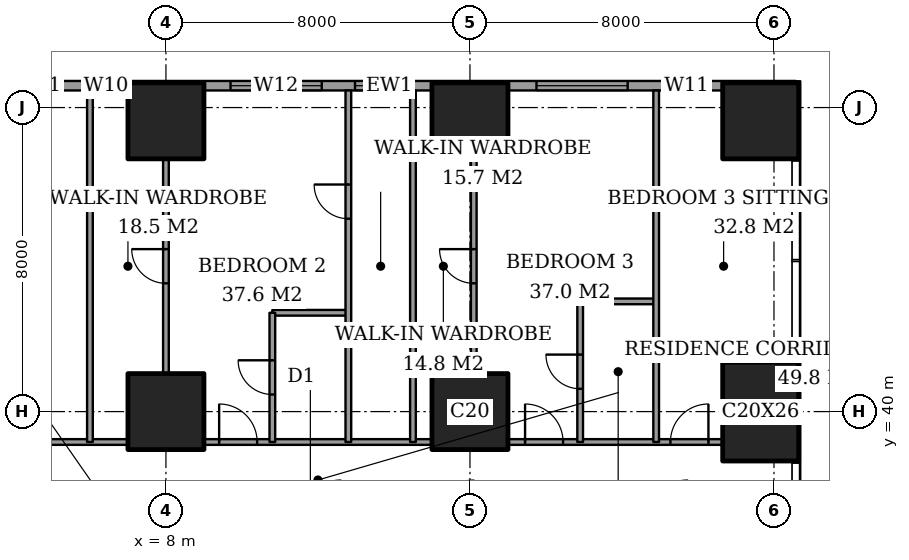
"""IFC4 building model, lengths in metres.
Left out: names, types, materials, properties, quantities, classifications, styles, units other than length and angle.
Written with IfcOpenShell. Run it as: python <this file> out.ifc"""

import sys

from ifc_helpers import new_model, si_unit, direction, frame, frame_2d, origin, origin_2d, place, context, subcontext, project, spatial, rectangle, extrude, element, fill, save


model = new_model("IFC4")
c1 = context("Model", 3, precision=1e-05, world=origin(), true_north=direction((0.0, 1.0)))
c2 = subcontext(c1, "Body", "Model", "MODEL_VIEW")
j1 = project(units=[si_unit("LENGTHUNIT", "METRE"), si_unit("PLANEANGLEUNIT", "RADIAN")], contexts=[c1])
p1 = place(None, origin())
s1 = spatial("IfcSite", under=j1, at=p1, CompositionType="ELEMENT")
p2 = place(p1, origin())
s2 = spatial("IfcBuilding", under=s1, at=p2, CompositionType="ELEMENT")
p3 = place(p2, frame((0.0, 0.0, 114.2)))
s3 = spatial("IfcBuildingStorey", under=s2, at=p3, CompositionType="ELEMENT", Elevation=114.2)
for number, where, z_axis, x_axis in (
    (1, (8.0, 40.0, 0.0), (0.0, 0.0, 1.0), (1.0, 0.0, 0.0)),
    (2, (8.0, 47.65, 0.0), (0.0, 0.0, 1.0), (1.0, 0.0, 0.0)),
    (3, (16.0, 40.0, 0.0), (0.0, 0.0, 1.0), (1.0, 0.0, 0.0)),
    (4, (16.0, 47.65, 0.0), (0.0, 0.0, 1.0), (1.0, 0.0, 0.0)),
):
    element("IfcColumn", number, at=place(p3, frame(where, z_axis=z_axis, x_axis=x_axis)), inside=s3, PredefinedType="COLUMN", context=c2, shape_type="SweptSolid", body=[
        extrude(rectangle(XDim=2.0, YDim=2.0, at=origin_2d()), origin(), (0.0, 0.0, 1.0), 3.6),
    ])
p4 = place(p3, frame((23.65, 40.0, 0.0), z_axis=(0.0, 0.0, 1.0), x_axis=(1.0, 0.0, 0.0)))
e5 = element("IfcColumn", 5, at=p4, inside=s3, PredefinedType="COLUMN", context=c2, shape_type="SweptSolid", body=[
    extrude(rectangle(XDim=2.0, YDim=2.6, at=origin_2d()), origin(), (0.0, 0.0, 1.0), 3.6),
])
p5 = place(p3, frame((23.65, 47.65, 0.0), z_axis=(0.0, 0.0, 1.0), x_axis=(1.0, 0.0, 0.0)))
e6 = element("IfcColumn", 6, at=p5, inside=s3, PredefinedType="COLUMN", context=c2, shape_type="SweptSolid", body=[
    extrude(rectangle(XDim=2.0, YDim=2.0, at=origin_2d()), origin(), (0.0, 0.0, 1.0), 3.6),
])
p6 = place(p3, frame((24.575, 48.575, 0.0), z_axis=(0.0, 0.0, 1.0), x_axis=(-1.0, 0.0, 0.0)))
e7 = element("IfcWall", 7, at=p6, inside=s3, PredefinedType="SOLIDWALL", context=c2, shape_type="SweptSolid", body=[
    extrude(rectangle(XDim=21.4, YDim=0.25, at=frame_2d((10.7, 0.0))), origin(), (0.0, 0.0, 1.0), 3.6),
])
p7 = place(p6, frame((2.275, 0.0, 0.4)))
e8 = element("IfcOpeningElement", 8, at=p7, cuts=e7, PredefinedType="OPENING", context=c2, shape_type="SweptSolid", body=[
    extrude(rectangle(XDim=1.2, YDim=2.2, at=frame_2d((0.6, 1.1))), frame((0.0, 0.135, 0.0), z_axis=(0.0, -1.0, 0.0), x_axis=(1.0, 0.0, 0.0)), (0.0, 0.0, 1.0), 0.27),
])
p8 = place(p6, frame((4.425, 0.0, 0.4)))
e9 = element("IfcOpeningElement", 9, at=p8, cuts=e7, PredefinedType="OPENING", context=c2, shape_type="SweptSolid", body=[
    extrude(rectangle(XDim=2.4, YDim=2.2, at=frame_2d((1.2, 1.1))), frame((0.0, 0.135, 0.0), z_axis=(0.0, -1.0, 0.0), x_axis=(1.0, 0.0, 0.0)), (0.0, 0.0, 1.0), 0.27),
])
p9 = place(p6, frame((10.4, 0.0, 0.4)))
e10 = element("IfcOpeningElement", 10, at=p9, cuts=e7, PredefinedType="OPENING", context=c2, shape_type="SweptSolid", body=[
    extrude(rectangle(XDim=1.2, YDim=2.2, at=frame_2d((0.6, 1.1))), frame((0.0, 0.135, 0.0), z_axis=(0.0, -1.0, 0.0), x_axis=(1.0, 0.0, 0.0)), (0.0, 0.0, 1.0), 0.27),
])
p10 = place(p6, frame((12.475, 0.0, 0.4)))
e11 = element("IfcOpeningElement", 11, at=p10, cuts=e7, PredefinedType="OPENING", context=c2, shape_type="SweptSolid", body=[
    extrude(rectangle(XDim=2.4, YDim=2.2, at=frame_2d((1.2, 1.1))), frame((0.0, 0.135, 0.0), z_axis=(0.0, -1.0, 0.0), x_axis=(1.0, 0.0, 0.0)), (0.0, 0.0, 1.0), 0.27),
])
p11 = place(p6, frame((17.85, 0.0, 0.4)))
e12 = element("IfcOpeningElement", 12, at=p11, cuts=e7, PredefinedType="OPENING", context=c2, shape_type="SweptSolid", body=[
    extrude(rectangle(XDim=0.6, YDim=2.2, at=frame_2d((0.3, 1.1))), frame((0.0, 0.135, 0.0), z_axis=(0.0, -1.0, 0.0), x_axis=(1.0, 0.0, 0.0)), (0.0, 0.0, 1.0), 0.27),
])
p12 = place(p6, frame((19.325, 0.0, 0.4)))
e13 = element("IfcOpeningElement", 13, at=p12, cuts=e7, PredefinedType="OPENING", context=c2, shape_type="SweptSolid", body=[
    extrude(rectangle(XDim=1.2, YDim=2.2, at=frame_2d((0.6, 1.1))), frame((0.0, 0.135, 0.0), z_axis=(0.0, -1.0, 0.0), x_axis=(1.0, 0.0, 0.0)), (0.0, 0.0, 1.0), 0.27),
])
p13 = place(p3, frame((1.35, 39.2, 0.0), z_axis=(0.0, 0.0, 1.0), x_axis=(1.0, 0.0, 0.0)))
e14 = element("IfcWall", 14, at=p13, inside=s3, PredefinedType="PARTITIONING", context=c2, shape_type="SweptSolid", body=[
    extrude(rectangle(XDim=5.65, YDim=0.15, at=frame_2d((2.825, 0.0))), origin(), (0.0, 0.0, 1.0), 3.35),
])
p14 = place(p13, frame((1.825, 0.0, 0.0)))
e15 = element("IfcOpeningElement", 15, at=p14, cuts=e14, PredefinedType="OPENING", context=c2, shape_type="SweptSolid", body=[
    extrude(rectangle(XDim=1.0, YDim=2.1, at=frame_2d((0.5, 1.05))), frame((0.0, 0.085, 0.0), z_axis=(0.0, -1.0, 0.0), x_axis=(1.0, 0.0, 0.0)), (0.0, 0.0, 1.0), 0.17),
])
p15 = place(p3, frame((9.0, 39.2, 0.0), z_axis=(0.0, 0.0, 1.0), x_axis=(1.0, 0.0, 0.0)))
e16 = element("IfcWall", 16, at=p15, inside=s3, PredefinedType="PARTITIONING", context=c2, shape_type="SweptSolid", body=[
    extrude(rectangle(XDim=6.0, YDim=0.15, at=frame_2d((3.0, 0.0))), origin(), (0.0, 0.0, 1.0), 3.35),
])
p16 = place(p15, frame((0.4, 0.0, 0.0)))
e17 = element("IfcOpeningElement", 17, at=p16, cuts=e16, PredefinedType="OPENING", context=c2, shape_type="SweptSolid", body=[
    extrude(rectangle(XDim=1.0, YDim=2.1, at=frame_2d((0.5, 1.05))), frame((0.0, 0.085, 0.0), z_axis=(0.0, -1.0, 0.0), x_axis=(1.0, 0.0, 0.0)), (0.0, 0.0, 1.0), 0.17),
])
p17 = place(p3, frame((17.0, 39.2, 0.0), z_axis=(0.0, 0.0, 1.0), x_axis=(1.0, 0.0, 0.0)))
e18 = element("IfcWall", 18, at=p17, inside=s3, PredefinedType="PARTITIONING", context=c2, shape_type="SweptSolid", body=[
    extrude(rectangle(XDim=5.65, YDim=0.15, at=frame_2d((2.825, 0.0))), origin(), (0.0, 0.0, 1.0), 3.35),
])
p18 = place(p17, frame((0.45, 0.0, 0.0)))
e19 = element("IfcOpeningElement", 19, at=p18, cuts=e18, PredefinedType="OPENING", context=c2, shape_type="SweptSolid", body=[
    extrude(rectangle(XDim=1.0, YDim=2.1, at=frame_2d((0.5, 1.05))), frame((0.0, 0.085, 0.0), z_axis=(0.0, -1.0, 0.0), x_axis=(1.0, 0.0, 0.0)), (0.0, 0.0, 1.0), 0.17),
])
p19 = place(p17, frame((4.275, 0.0, 0.0)))
e20 = element("IfcOpeningElement", 20, at=p19, cuts=e18, PredefinedType="OPENING", context=c2, shape_type="SweptSolid", body=[
    extrude(rectangle(XDim=1.0, YDim=2.1, at=frame_2d((0.5, 1.05))), frame((0.0, 0.085, 0.0), z_axis=(0.0, -1.0, 0.0), x_axis=(1.0, 0.0, 0.0)), (0.0, 0.0, 1.0), 0.17),
])
for number, where, z_axis, x_axis in (
    (21, (10.8, 42.6, 0.0), (0.0, 0.0, 1.0), (1.0, 0.0, 0.0)),
    (22, (18.9, 42.9, 0.0), (0.0, 0.0, 1.0), (1.0, 0.0, 0.0)),
):
    element("IfcWall", number, at=place(p3, frame(where, z_axis=z_axis, x_axis=x_axis)), inside=s3, PredefinedType="PARTITIONING", context=c2, shape_type="SweptSolid", body=[
        extrude(rectangle(XDim=2.0, YDim=0.15, at=frame_2d((1.0, 0.0))), origin(), (0.0, 0.0, 1.0), 3.35),
    ])
p20 = place(p3, frame((6.0, 39.2, 0.0), z_axis=(0.0, 0.0, 1.0), x_axis=(0.0, 1.0, 0.0)))
e23 = element("IfcWall", 23, at=p20, inside=s3, PredefinedType="PARTITIONING", context=c2, shape_type="SweptSolid", body=[
    extrude(rectangle(XDim=9.25, YDim=0.15, at=frame_2d((4.625, 0.0))), origin(), (0.0, 0.0, 1.0), 3.35),
])
p21 = place(p3, frame((8.0, 41.0, 0.0), z_axis=(0.0, 0.0, 1.0), x_axis=(0.0, 1.0, 0.0)))
e24 = element("IfcWall", 24, at=p21, inside=s3, PredefinedType="PARTITIONING", context=c2, shape_type="SweptSolid", body=[
    extrude(rectangle(XDim=5.65, YDim=0.15, at=frame_2d((2.825, 0.0))), origin(), (0.0, 0.0, 1.0), 3.35),
])
p22 = place(p21, frame((2.375, 0.0, 0.0)))
e25 = element("IfcOpeningElement", 25, at=p22, cuts=e24, PredefinedType="OPENING", context=c2, shape_type="SweptSolid", body=[
    extrude(rectangle(XDim=0.9, YDim=2.1, at=frame_2d((0.45, 1.05))), frame((0.0, 0.085, 0.0), z_axis=(0.0, -1.0, 0.0), x_axis=(1.0, 0.0, 0.0)), (0.0, 0.0, 1.0), 0.17),
])
p23 = place(p3, frame((10.8, 39.2, 0.0), z_axis=(0.0, 0.0, 1.0), x_axis=(0.0, 1.0, 0.0)))
e26 = element("IfcWall", 26, at=p23, inside=s3, PredefinedType="PARTITIONING", context=c2, shape_type="SweptSolid", body=[
    extrude(rectangle(XDim=3.4, YDim=0.15, at=frame_2d((1.7, 0.0))), origin(), (0.0, 0.0, 1.0), 3.35),
])
p24 = place(p23, frame((1.25, 0.0, 0.0)))
e27 = element("IfcOpeningElement", 27, at=p24, cuts=e26, PredefinedType="OPENING", context=c2, shape_type="SweptSolid", body=[
    extrude(rectangle(XDim=0.9, YDim=2.1, at=frame_2d((0.45, 1.05))), frame((0.0, 0.085, 0.0), z_axis=(0.0, -1.0, 0.0), x_axis=(1.0, 0.0, 0.0)), (0.0, 0.0, 1.0), 0.17),
])
p25 = place(p3, frame((12.8, 39.2, 0.0), z_axis=(0.0, 0.0, 1.0), x_axis=(0.0, 1.0, 0.0)))
e28 = element("IfcWall", 28, at=p25, inside=s3, PredefinedType="PARTITIONING", context=c2, shape_type="SweptSolid", body=[
    extrude(rectangle(XDim=9.25, YDim=0.15, at=frame_2d((4.625, 0.0))), origin(), (0.0, 0.0, 1.0), 3.35),
])
p26 = place(p25, frame((5.875, 0.0, 0.0)))
e29 = element("IfcOpeningElement", 29, at=p26, cuts=e28, PredefinedType="OPENING", context=c2, shape_type="SweptSolid", body=[
    extrude(rectangle(XDim=0.9, YDim=2.1, at=frame_2d((0.45, 1.05))), frame((0.0, 0.085, 0.0), z_axis=(0.0, -1.0, 0.0), x_axis=(1.0, 0.0, 0.0)), (0.0, 0.0, 1.0), 0.17),
])
p27 = place(p3, frame((14.5, 39.2, 0.0), z_axis=(0.0, 0.0, 1.0), x_axis=(0.0, 1.0, 0.0)))
e30 = element("IfcWall", 30, at=p27, inside=s3, PredefinedType="PARTITIONING", context=c2, shape_type="SweptSolid", body=[
    extrude(rectangle(XDim=9.25, YDim=0.15, at=frame_2d((4.625, 0.0))), origin(), (0.0, 0.0, 1.0), 3.35),
])
p28 = place(p3, frame((16.1, 41.0, 0.0), z_axis=(0.0, 0.0, 1.0), x_axis=(0.0, 1.0, 0.0)))
e31 = element("IfcWall", 31, at=p28, inside=s3, PredefinedType="PARTITIONING", context=c2, shape_type="SweptSolid", body=[
    extrude(rectangle(XDim=5.65, YDim=0.15, at=frame_2d((2.825, 0.0))), origin(), (0.0, 0.0, 1.0), 3.35),
])
p29 = place(p28, frame((2.375, 0.0, 0.0)))
e32 = element("IfcOpeningElement", 32, at=p29, cuts=e31, PredefinedType="OPENING", context=c2, shape_type="SweptSolid", body=[
    extrude(rectangle(XDim=0.9, YDim=2.1, at=frame_2d((0.45, 1.05))), frame((0.0, 0.085, 0.0), z_axis=(0.0, -1.0, 0.0), x_axis=(1.0, 0.0, 0.0)), (0.0, 0.0, 1.0), 0.17),
])
p30 = place(p3, frame((18.9, 39.2, 0.0), z_axis=(0.0, 0.0, 1.0), x_axis=(0.0, 1.0, 0.0)))
e33 = element("IfcWall", 33, at=p30, inside=s3, PredefinedType="PARTITIONING", context=c2, shape_type="SweptSolid", body=[
    extrude(rectangle(XDim=3.7, YDim=0.15, at=frame_2d((1.85, 0.0))), origin(), (0.0, 0.0, 1.0), 3.35),
])
p31 = place(p30, frame((1.4, 0.0, 0.0)))
e34 = element("IfcOpeningElement", 34, at=p31, cuts=e33, PredefinedType="OPENING", context=c2, shape_type="SweptSolid", body=[
    extrude(rectangle(XDim=0.9, YDim=2.1, at=frame_2d((0.45, 1.05))), frame((0.0, 0.085, 0.0), z_axis=(0.0, -1.0, 0.0), x_axis=(1.0, 0.0, 0.0)), (0.0, 0.0, 1.0), 0.17),
])
p32 = place(p3, frame((20.9, 39.2, 0.0), z_axis=(0.0, 0.0, 1.0), x_axis=(0.0, 1.0, 0.0)))
e35 = element("IfcWall", 35, at=p32, inside=s3, PredefinedType="PARTITIONING", context=c2, shape_type="SweptSolid", body=[
    extrude(rectangle(XDim=9.25, YDim=0.15, at=frame_2d((4.625, 0.0))), origin(), (0.0, 0.0, 1.0), 3.35),
])
p33 = place(p7, origin())
e36 = element("IfcWindow", 36, at=p33, inside=s3, PartitioningType="SINGLE_PANEL", PredefinedType="WINDOW", context=c2, shape_type="SweptSolid", body=[
    extrude(rectangle(XDim=1.2, YDim=2.2, at=frame_2d((0.6, 1.1))), frame((0.0, 0.03, 0.0), z_axis=(0.0, -1.0, 0.0), x_axis=(1.0, 0.0, 0.0)), (0.0, 0.0, 1.0), 0.06),
])
fill(e8, e36)
p34 = place(p8, origin())
e37 = element("IfcWindow", 37, at=p34, inside=s3, PartitioningType="SINGLE_PANEL", PredefinedType="WINDOW", context=c2, shape_type="SweptSolid", body=[
    extrude(rectangle(XDim=2.4, YDim=2.2, at=frame_2d((1.2, 1.1))), frame((0.0, 0.03, 0.0), z_axis=(0.0, -1.0, 0.0), x_axis=(1.0, 0.0, 0.0)), (0.0, 0.0, 1.0), 0.06),
])
fill(e9, e37)
p35 = place(p9, origin())
e38 = element("IfcWindow", 38, at=p35, inside=s3, PartitioningType="SINGLE_PANEL", PredefinedType="WINDOW", context=c2, shape_type="SweptSolid", body=[
    extrude(rectangle(XDim=1.2, YDim=2.2, at=frame_2d((0.6, 1.1))), frame((0.0, 0.03, 0.0), z_axis=(0.0, -1.0, 0.0), x_axis=(1.0, 0.0, 0.0)), (0.0, 0.0, 1.0), 0.06),
])
fill(e10, e38)
p36 = place(p10, origin())
e39 = element("IfcWindow", 39, at=p36, inside=s3, PartitioningType="SINGLE_PANEL", PredefinedType="WINDOW", context=c2, shape_type="SweptSolid", body=[
    extrude(rectangle(XDim=2.4, YDim=2.2, at=frame_2d((1.2, 1.1))), frame((0.0, 0.03, 0.0), z_axis=(0.0, -1.0, 0.0), x_axis=(1.0, 0.0, 0.0)), (0.0, 0.0, 1.0), 0.06),
])
fill(e11, e39)
p37 = place(p11, origin())
e40 = element("IfcWindow", 40, at=p37, inside=s3, PartitioningType="SINGLE_PANEL", PredefinedType="WINDOW", context=c2, shape_type="SweptSolid", body=[
    extrude(rectangle(XDim=0.6, YDim=2.2, at=frame_2d((0.3, 1.1))), frame((0.0, 0.03, 0.0), z_axis=(0.0, -1.0, 0.0), x_axis=(1.0, 0.0, 0.0)), (0.0, 0.0, 1.0), 0.06),
])
fill(e12, e40)
p38 = place(p12, origin())
e41 = element("IfcWindow", 41, at=p38, inside=s3, PartitioningType="SINGLE_PANEL", PredefinedType="WINDOW", context=c2, shape_type="SweptSolid", body=[
    extrude(rectangle(XDim=1.2, YDim=2.2, at=frame_2d((0.6, 1.1))), frame((0.0, 0.03, 0.0), z_axis=(0.0, -1.0, 0.0), x_axis=(1.0, 0.0, 0.0)), (0.0, 0.0, 1.0), 0.06),
])
fill(e13, e41)
p39 = place(p22, origin())
e42 = element("IfcDoor", 42, at=p39, inside=s3, OperationType="SINGLE_SWING_LEFT", PredefinedType="DOOR", context=c2, shape_type="SweptSolid", body=[
    extrude(rectangle(XDim=0.9, YDim=2.1, at=frame_2d((0.45, 1.05))), frame((0.0, 0.025, 0.0), z_axis=(0.0, -1.0, 0.0), x_axis=(1.0, 0.0, 0.0)), (0.0, 0.0, 1.0), 0.05),
])
fill(e25, e42)
p40 = place(p24, origin())
e43 = element("IfcDoor", 43, at=p40, inside=s3, OperationType="SINGLE_SWING_LEFT", PredefinedType="DOOR", context=c2, shape_type="SweptSolid", body=[
    extrude(rectangle(XDim=0.9, YDim=2.1, at=frame_2d((0.45, 1.05))), frame((0.0, 0.025, 0.0), z_axis=(0.0, -1.0, 0.0), x_axis=(1.0, 0.0, 0.0)), (0.0, 0.0, 1.0), 0.05),
])
fill(e27, e43)
p41 = place(p16, origin())
e44 = element("IfcDoor", 44, at=p41, inside=s3, OperationType="SINGLE_SWING_RIGHT", PredefinedType="DOOR", context=c2, shape_type="SweptSolid", body=[
    extrude(rectangle(XDim=1.0, YDim=2.1, at=frame_2d((0.5, 1.05))), frame((0.0, 0.025, 0.0), z_axis=(0.0, -1.0, 0.0), x_axis=(1.0, 0.0, 0.0)), (0.0, 0.0, 1.0), 0.05),
])
fill(e17, e44)
p42 = place(p26, origin())
e45 = element("IfcDoor", 45, at=p42, inside=s3, OperationType="SINGLE_SWING_LEFT", PredefinedType="DOOR", context=c2, shape_type="SweptSolid", body=[
    extrude(rectangle(XDim=0.9, YDim=2.1, at=frame_2d((0.45, 1.05))), frame((0.0, 0.025, 0.0), z_axis=(0.0, -1.0, 0.0), x_axis=(1.0, 0.0, 0.0)), (0.0, 0.0, 1.0), 0.05),
])
fill(e29, e45)
p43 = place(p29, origin())
e46 = element("IfcDoor", 46, at=p43, inside=s3, OperationType="SINGLE_SWING_LEFT", PredefinedType="DOOR", context=c2, shape_type="SweptSolid", body=[
    extrude(rectangle(XDim=0.9, YDim=2.1, at=frame_2d((0.45, 1.05))), frame((0.0, 0.025, 0.0), z_axis=(0.0, -1.0, 0.0), x_axis=(1.0, 0.0, 0.0)), (0.0, 0.0, 1.0), 0.05),
])
fill(e32, e46)
p44 = place(p31, origin())
e47 = element("IfcDoor", 47, at=p44, inside=s3, OperationType="SINGLE_SWING_LEFT", PredefinedType="DOOR", context=c2, shape_type="SweptSolid", body=[
    extrude(rectangle(XDim=0.9, YDim=2.1, at=frame_2d((0.45, 1.05))), frame((0.0, 0.025, 0.0), z_axis=(0.0, -1.0, 0.0), x_axis=(1.0, 0.0, 0.0)), (0.0, 0.0, 1.0), 0.05),
])
fill(e34, e47)
p45 = place(p18, origin())
e48 = element("IfcDoor", 48, at=p45, inside=s3, OperationType="SINGLE_SWING_RIGHT", PredefinedType="DOOR", context=c2, shape_type="SweptSolid", body=[
    extrude(rectangle(XDim=1.0, YDim=2.1, at=frame_2d((0.5, 1.05))), frame((0.0, 0.025, 0.0), z_axis=(0.0, -1.0, 0.0), x_axis=(1.0, 0.0, 0.0)), (0.0, 0.0, 1.0), 0.05),
])
fill(e19, e48)
p46 = place(p19, origin())
e49 = element("IfcDoor", 49, at=p46, inside=s3, OperationType="SINGLE_SWING_LEFT", PredefinedType="DOOR", context=c2, shape_type="SweptSolid", body=[
    extrude(rectangle(XDim=1.0, YDim=2.1, at=frame_2d((0.5, 1.05))), frame((0.0, 0.025, 0.0), z_axis=(0.0, -1.0, 0.0), x_axis=(1.0, 0.0, 0.0)), (0.0, 0.0, 1.0), 0.05),
])
fill(e20, e49)
save(model, sys.argv[1])
